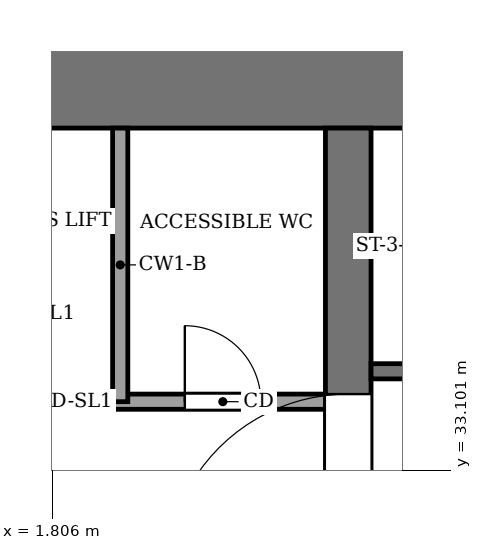
"""IFC4 building model, lengths in metres.
Left out: names, types, materials, properties, quantities, classifications, styles, units other than length and angle.
Written with IfcOpenShell. Run it as: python <this file> out.ifc"""

import sys

from ifc_helpers import new_model, si_unit, direction, frame, frame_2d, origin, place, context, subcontext, project, spatial, rectangle, extrude, element, fill, save


model = new_model("IFC4")
c1 = context("Model", 3, precision=1e-05, world=origin(), true_north=direction((0.0, 1.0)))
c2 = subcontext(c1, "Body", "Model", "MODEL_VIEW")
j1 = project(units=[si_unit("LENGTHUNIT", "METRE"), si_unit("PLANEANGLEUNIT", "RADIAN")], contexts=[c1])
p1 = place(None, origin())
s1 = spatial("IfcSite", under=j1, at=p1, CompositionType="ELEMENT")
p2 = place(p1, origin())
s2 = spatial("IfcBuilding", under=s1, at=p2, CompositionType="ELEMENT")
p3 = place(p2, origin())
s3 = spatial("IfcBuildingStorey", under=s2, at=p3, CompositionType="ELEMENT", Elevation=0.0)
p4 = place(p3, frame((-14.0, 38.3, -0.45), z_axis=(0.0, 0.0, 1.0), x_axis=(1.0, 0.0, 0.0)))
e1 = element("IfcWall", 1, at=p4, inside=s3, PredefinedType="SHEAR", context=c2, shape_type="SweptSolid", body=[
    extrude(rectangle(XDim=28.0, YDim=1.4, at=frame_2d((14.0, 0.0))), origin(), (0.0, 0.0, 1.0), 9.32),
])
p5 = place(p3, frame((5.7, 18.4, -0.45), z_axis=(0.0, 0.0, 1.0), x_axis=(0.0, 1.0, 0.0)))
e2 = element("IfcWall", 2, at=p5, inside=s3, PredefinedType="SHEAR", context=c2, shape_type="SweptSolid", body=[
    extrude(rectangle(XDim=19.2, YDim=0.6, at=frame_2d((9.6, 0.0))), origin(), (0.0, 0.0, 1.0), 9.32),
])
p6 = place(p5, frame((13.3, 0.0, 0.45)))
e3 = element("IfcOpeningElement", 3, at=p6, cuts=e2, PredefinedType="OPENING", context=c2, shape_type="SweptSolid", body=[
    extrude(rectangle(XDim=2.4, YDim=2.4, at=frame_2d((1.2, 1.2))), frame((0.0, 0.31, 0.0), z_axis=(0.0, -1.0, 0.0), x_axis=(1.0, 0.0, 0.0)), (0.0, 0.0, 1.0), 0.62),
])
p7 = place(p3, frame((-5.4, 34.0, 0.0), z_axis=(0.0, 0.0, 1.0), x_axis=(1.0, 0.0, 0.0)))
e4 = element("IfcWall", 4, at=p7, inside=s3, PredefinedType="PARTITIONING", context=c2, shape_type="SweptSolid", body=[
    extrude(rectangle(XDim=10.8, YDim=0.2, at=frame_2d((5.4, 0.0))), origin(), (0.0, 0.0, 1.0), 8.87),
])
p8 = place(p7, frame((0.75, 0.0, 0.0)))
e5 = element("IfcOpeningElement", 5, at=p8, cuts=e4, PredefinedType="OPENING", context=c2, shape_type="SweptSolid", body=[
    extrude(rectangle(XDim=1.2, YDim=2.2, at=frame_2d((0.6, 1.1))), frame((0.0, 0.11, 0.0), z_axis=(0.0, -1.0, 0.0), x_axis=(1.0, 0.0, 0.0)), (0.0, 0.0, 1.0), 0.22),
])
p9 = place(p7, frame((3.45, 0.0, 0.0)))
e6 = element("IfcOpeningElement", 6, at=p9, cuts=e4, PredefinedType="OPENING", context=c2, shape_type="SweptSolid", body=[
    extrude(rectangle(XDim=1.2, YDim=2.2, at=frame_2d((0.6, 1.1))), frame((0.0, 0.11, 0.0), z_axis=(0.0, -1.0, 0.0), x_axis=(1.0, 0.0, 0.0)), (0.0, 0.0, 1.0), 0.22),
])
p10 = place(p7, frame((6.15, 0.0, 0.0)))
e7 = element("IfcOpeningElement", 7, at=p10, cuts=e4, PredefinedType="OPENING", context=c2, shape_type="SweptSolid", body=[
    extrude(rectangle(XDim=1.2, YDim=2.2, at=frame_2d((0.6, 1.1))), frame((0.0, 0.11, 0.0), z_axis=(0.0, -1.0, 0.0), x_axis=(1.0, 0.0, 0.0)), (0.0, 0.0, 1.0), 0.22),
])
p11 = place(p7, frame((8.95, 0.0, 0.0)))
e8 = element("IfcOpeningElement", 8, at=p11, cuts=e4, PredefinedType="OPENING", context=c2, shape_type="SweptSolid", body=[
    extrude(rectangle(XDim=1.0, YDim=2.1, at=frame_2d((0.5, 1.05))), frame((0.0, 0.11, 0.0), z_axis=(0.0, -1.0, 0.0), x_axis=(1.0, 0.0, 0.0)), (0.0, 0.0, 1.0), 0.22),
])
p12 = place(p3, frame((6.0, 34.4, 0.0), z_axis=(0.0, 0.0, 1.0), x_axis=(1.0, 0.0, 0.0)))
e9 = element("IfcWall", 9, at=p12, inside=s3, PredefinedType="PARTITIONING", context=c2, shape_type="SweptSolid", body=[
    extrude(rectangle(XDim=6.6, YDim=0.2, at=frame_2d((3.3, 0.0))), origin(), (0.0, 0.0, 1.0), 8.87),
])
p13 = place(p12, frame((4.8, 0.0, 0.0)))
e10 = element("IfcOpeningElement", 10, at=p13, cuts=e9, PredefinedType="OPENING", context=c2, shape_type="SweptSolid", body=[
    extrude(rectangle(XDim=1.2, YDim=2.2, at=frame_2d((0.6, 1.1))), frame((0.0, 0.11, 0.0), z_axis=(0.0, -1.0, 0.0), x_axis=(1.0, 0.0, 0.0)), (0.0, 0.0, 1.0), 0.22),
])
p14 = place(p3, frame((2.7, 34.0, 0.0), z_axis=(0.0, 0.0, 1.0), x_axis=(0.0, 1.0, 0.0)))
e11 = element("IfcWall", 11, at=p14, inside=s3, PredefinedType="PARTITIONING", context=c2, shape_type="SweptSolid", body=[
    extrude(rectangle(XDim=3.6, YDim=0.2, at=frame_2d((1.8, 0.0))), origin(), (0.0, 0.0, 1.0), 8.87),
])
p15 = place(p10, origin())
e12 = element("IfcDoor", 12, at=p15, inside=s3, OperationType="SLIDING_TO_LEFT", PredefinedType="DOOR", context=c2, shape_type="SweptSolid", body=[
    extrude(rectangle(XDim=1.2, YDim=2.2, at=frame_2d((0.6, 1.1))), frame((0.0, 0.025, 0.0), z_axis=(0.0, -1.0, 0.0), x_axis=(1.0, 0.0, 0.0)), (0.0, 0.0, 1.0), 0.05),
])
fill(e7, e12)
p16 = place(p11, origin())
e13 = element("IfcDoor", 13, at=p16, inside=s3, OperationType="SINGLE_SWING_LEFT", PredefinedType="DOOR", context=c2, shape_type="SweptSolid", body=[
    extrude(rectangle(XDim=1.0, YDim=2.1, at=frame_2d((0.5, 1.05))), frame((0.0, 0.025, 0.0), z_axis=(0.0, -1.0, 0.0), x_axis=(1.0, 0.0, 0.0)), (0.0, 0.0, 1.0), 0.05),
])
fill(e8, e13)
p17 = place(p6, origin())
e14 = element("IfcDoor", 14, at=p17, inside=s3, OperationType="DOUBLE_DOOR_SINGLE_SWING", PredefinedType="DOOR", context=c2, shape_type="SweptSolid", body=[
    extrude(rectangle(XDim=2.4, YDim=2.4, at=frame_2d((1.2, 1.2))), frame((0.0, 0.025, 0.0), z_axis=(0.0, -1.0, 0.0), x_axis=(1.0, 0.0, 0.0)), (0.0, 0.0, 1.0), 0.05),
])
fill(e3, e14)
save(model, sys.argv[1])
